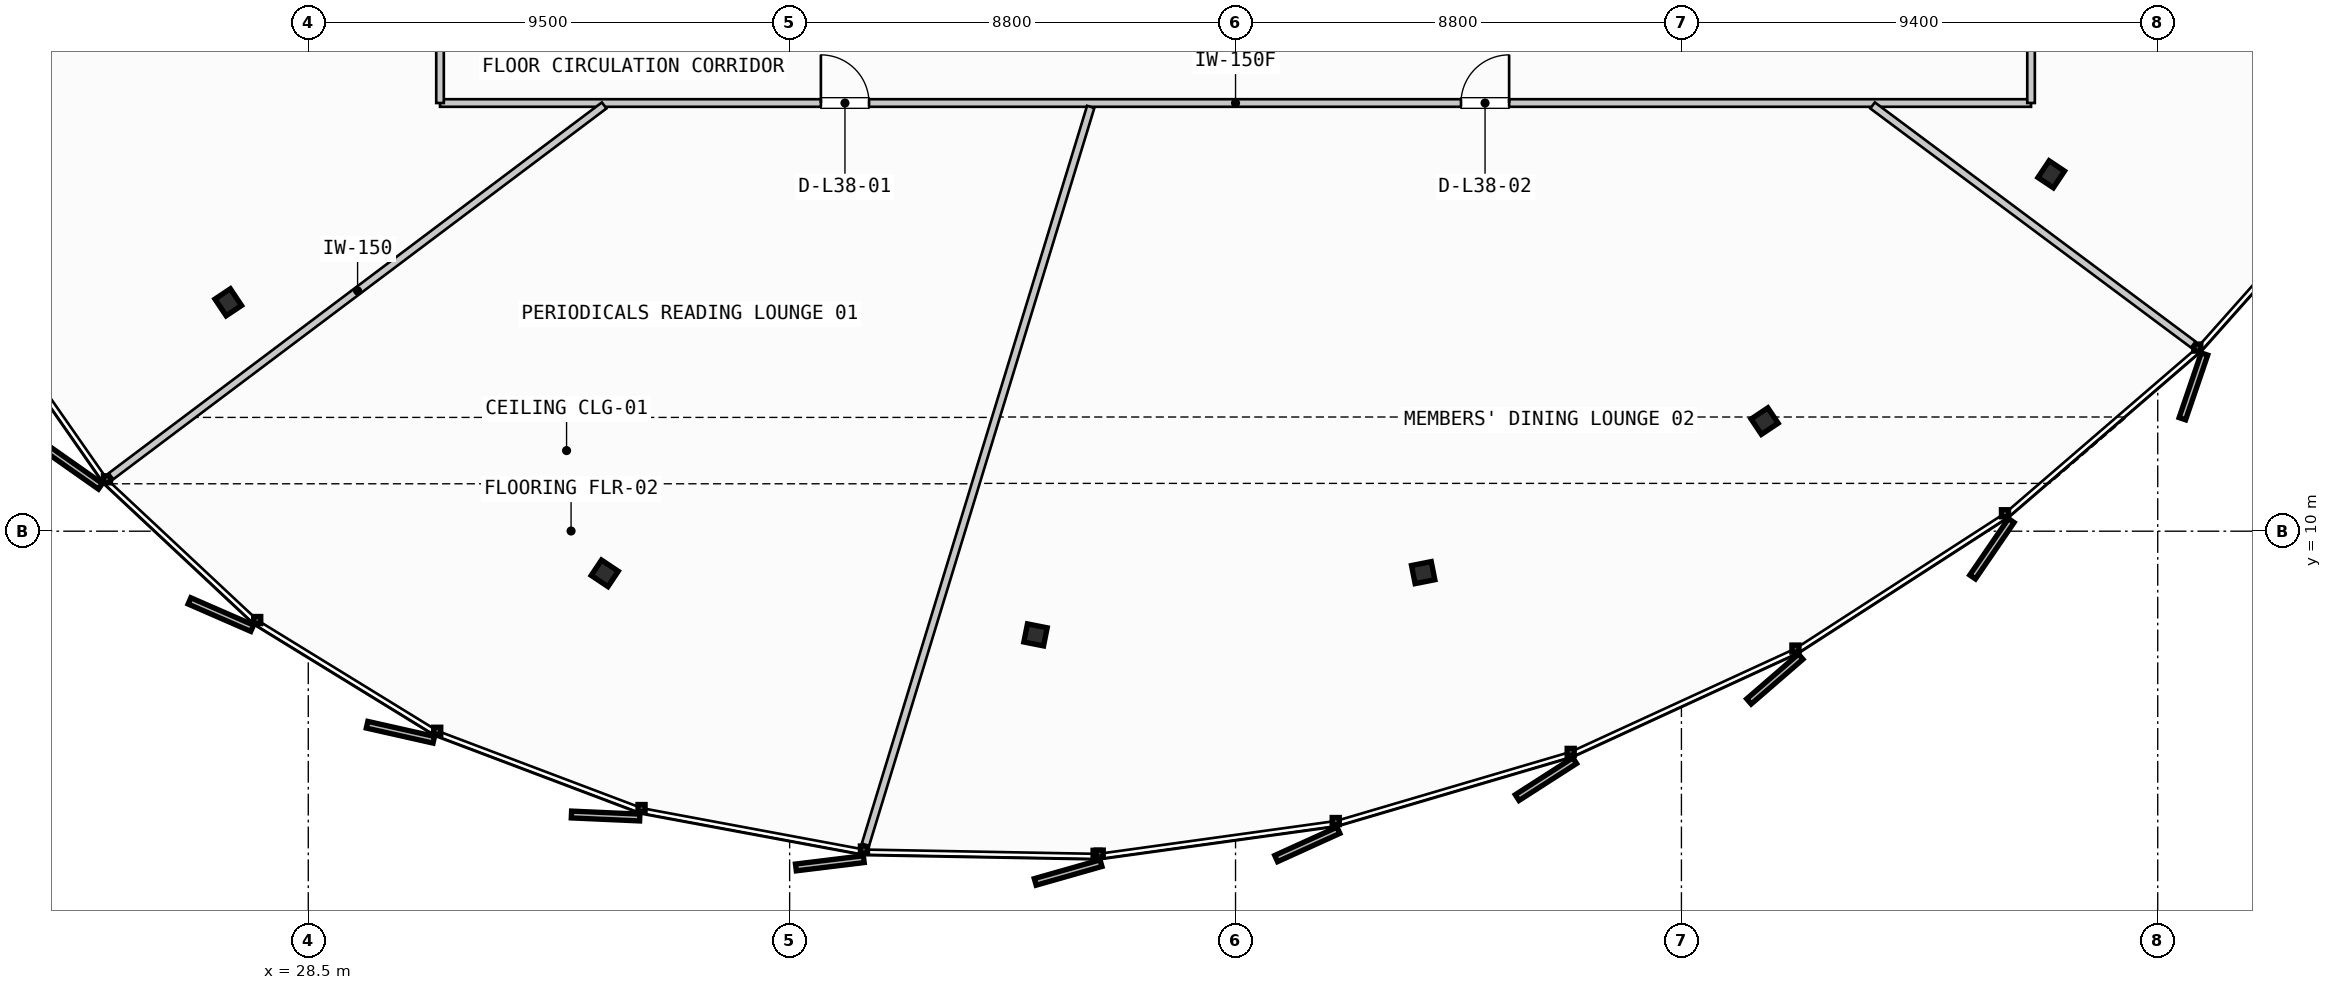
"""IFC4 building model, lengths in metres.
Left out: names, types, materials, properties, quantities, classifications, styles, units other than length and angle.
Written with IfcOpenShell. Run it as: python <this file> out.ifc"""

import sys

from ifc_helpers import new_model, si_unit, direction, frame, frame_2d, origin, origin_2d, place, context, subcontext, project, spatial, rectangle, i_section, extrude, source, transform, mapped, element, fill, save


model = new_model("IFC4")
c1 = context("Model", 3, precision=1e-05, world=origin(), true_north=direction((0.0, 1.0)))
c2 = subcontext(c1, "Body", "Model", "MODEL_VIEW")
j1 = project(units=[si_unit("LENGTHUNIT", "METRE"), si_unit("PLANEANGLEUNIT", "RADIAN")], contexts=[c1])
p1 = place(None, origin())
s1 = spatial("IfcSite", under=j1, at=p1, CompositionType="ELEMENT")
p2 = place(p1, origin())
s2 = spatial("IfcBuilding", under=s1, at=p2, CompositionType="ELEMENT")
p3 = place(p2, frame((0.0, 0.0, 150.1)))
s3 = spatial("IfcBuildingStorey", under=s2, at=p3, CompositionType="ELEMENT", Elevation=150.1)
m1 = source(origin(), c2, "Body", "SweptSolid", [
    extrude(i_section(OverallWidth=0.397, OverallDepth=0.365, WebThickness=0.028, FlangeThickness=0.044, FilletRadius=0.015, at=origin_2d()), origin(), (0.0, 0.0, 1.0), 3.3),
])
for number, where, z_axis, x_axis in (
    (1, (26.921, 14.517, 0.0), (0.0, 0.0, 1.0), (-0.831, -0.556, 0.0)),
    (2, (34.351, 9.168, 0.0), (0.0, 0.0, 1.0), (-0.556, -0.831, 0.0)),
    (3, (42.852, 7.954, 0.0), (0.0, 0.0, 1.0), (-0.195, -0.981, 0.0)),
    (4, (50.503, 9.182, 0.0), (0.0, 0.0, 1.0), (0.195, -0.981, 0.0)),
    (5, (57.242, 12.172, 0.0), (0.0, 0.0, 1.0), (0.556, -0.831, 0.0)),
    (6, (62.899, 17.043, 0.0), (0.0, 0.0, 1.0), (0.831, -0.556, 0.0)),
):
    element("IfcColumn", number, at=place(p3, frame(where, z_axis=z_axis, x_axis=x_axis)), inside=s3, PredefinedType="COLUMN", context=c2, shape_type="MappedRepresentation", body=[
        mapped(m1, transform((0.0, 0.0, 0.0), scale=1.0)),
    ])
p4 = place(p3, frame((31.1, 18.45, 0.0), z_axis=(0.0, 0.0, 1.0), x_axis=(1.0, 0.0, 0.0)))
e7 = element("IfcWall", 7, at=p4, inside=s3, PredefinedType="PARTITIONING", context=c2, shape_type="SweptSolid", body=[
    extrude(rectangle(XDim=31.4, YDim=0.15, at=frame_2d((15.7, 0.0))), origin(), (0.0, 0.0, 1.0), 2.28),
])
p5 = place(p4, frame((7.517, 0.0, 0.0)))
e8 = element("IfcOpeningElement", 8, at=p5, cuts=e7, PredefinedType="OPENING", context=c2, shape_type="SweptSolid", body=[
    extrude(rectangle(XDim=0.95, YDim=2.15, at=frame_2d((0.475, 1.075))), frame((0.0, 0.085, 0.0), z_axis=(0.0, -1.0, 0.0), x_axis=(1.0, 0.0, 0.0)), (0.0, 0.0, 1.0), 0.17),
])
p6 = place(p4, frame((20.149, 0.0, 0.0)))
e9 = element("IfcOpeningElement", 9, at=p6, cuts=e7, PredefinedType="OPENING", context=c2, shape_type="SweptSolid", body=[
    extrude(rectangle(XDim=0.95, YDim=2.15, at=frame_2d((0.475, 1.075))), frame((0.0, 0.085, 0.0), z_axis=(0.0, -1.0, 0.0), x_axis=(1.0, 0.0, 0.0)), (0.0, 0.0, 1.0), 0.17),
])
for number, where, z_axis, x_axis in (
    (10, (62.5, 18.45, 0.0), (0.0, 0.0, 1.0), (0.0, 1.0, 0.0)),
    (11, (31.1, 20.15, 0.0), (0.0, 0.0, 1.0), (0.0, -1.0, 0.0)),
):
    element("IfcWall", number, at=place(p3, frame(where, z_axis=z_axis, x_axis=x_axis)), inside=s3, PredefinedType="PARTITIONING", context=c2, shape_type="SweptSolid", body=[
        extrude(rectangle(XDim=1.7, YDim=0.15, at=frame_2d((0.85, 0.0))), origin(), (0.0, 0.0, 1.0), 2.28),
    ])
p7 = place(p3, frame((34.34, 18.402, 0.0), z_axis=(0.0, 0.0, 1.0), x_axis=(-0.799294488721, -0.600939531317, 0.0)))
e12 = element("IfcWall", 12, at=p7, inside=s3, PredefinedType="PARTITIONING", context=c2, shape_type="SweptSolid", body=[
    extrude(rectangle(XDim=12.177, YDim=0.15, at=frame_2d((6.088, 0.0))), origin(), (0.0, 0.0, 1.0), 2.28),
])
p8 = place(p3, frame((43.942, 18.374, 0.0), z_axis=(0.0, 0.0, 1.0), x_axis=(-0.292008300106, -0.95641578441, 0.0)))
e13 = element("IfcWall", 13, at=p8, inside=s3, PredefinedType="PARTITIONING", context=c2, shape_type="SweptSolid", body=[
    extrude(rectangle(XDim=15.224, YDim=0.15, at=frame_2d((7.612, 0.0))), origin(), (0.0, 0.0, 1.0), 2.28),
])
p9 = place(p3, frame((59.373, 18.402, 0.0), z_axis=(0.0, 0.0, 1.0), x_axis=(0.801659629697, -0.59778076091, 0.0)))
e14 = element("IfcWall", 14, at=p9, inside=s3, PredefinedType="PARTITIONING", context=c2, shape_type="SweptSolid", body=[
    extrude(rectangle(XDim=7.894, YDim=0.15, at=frame_2d((3.947, 0.0))), origin(), (0.0, 0.0, 1.0), 2.28),
])
m2 = source(origin(), c2, "Body", "SweptSolid", [
    extrude(rectangle(XDim=0.95, YDim=2.15, at=frame_2d((0.475, 1.075))), frame((0.0, 0.025, 0.0), z_axis=(0.0, -1.0, 0.0), x_axis=(1.0, 0.0, 0.0)), (0.0, 0.0, 1.0), 0.05),
])
p10 = place(p5, origin())
e15 = element("IfcDoor", 15, at=p10, inside=s3, OperationType="SINGLE_SWING_LEFT", PredefinedType="DOOR", context=c2, shape_type="MappedRepresentation", body=[
    mapped(m2, transform((0.0, 0.0, 0.0), scale=1.0)),
])
fill(e8, e15)
p11 = place(p6, origin())
e16 = element("IfcDoor", 16, at=p11, inside=s3, OperationType="SINGLE_SWING_RIGHT", PredefinedType="DOOR", context=c2, shape_type="MappedRepresentation", body=[
    mapped(m2, transform((0.0, 0.0, 0.0), scale=1.0)),
])
fill(e9, e16)
save(model, sys.argv[1])
